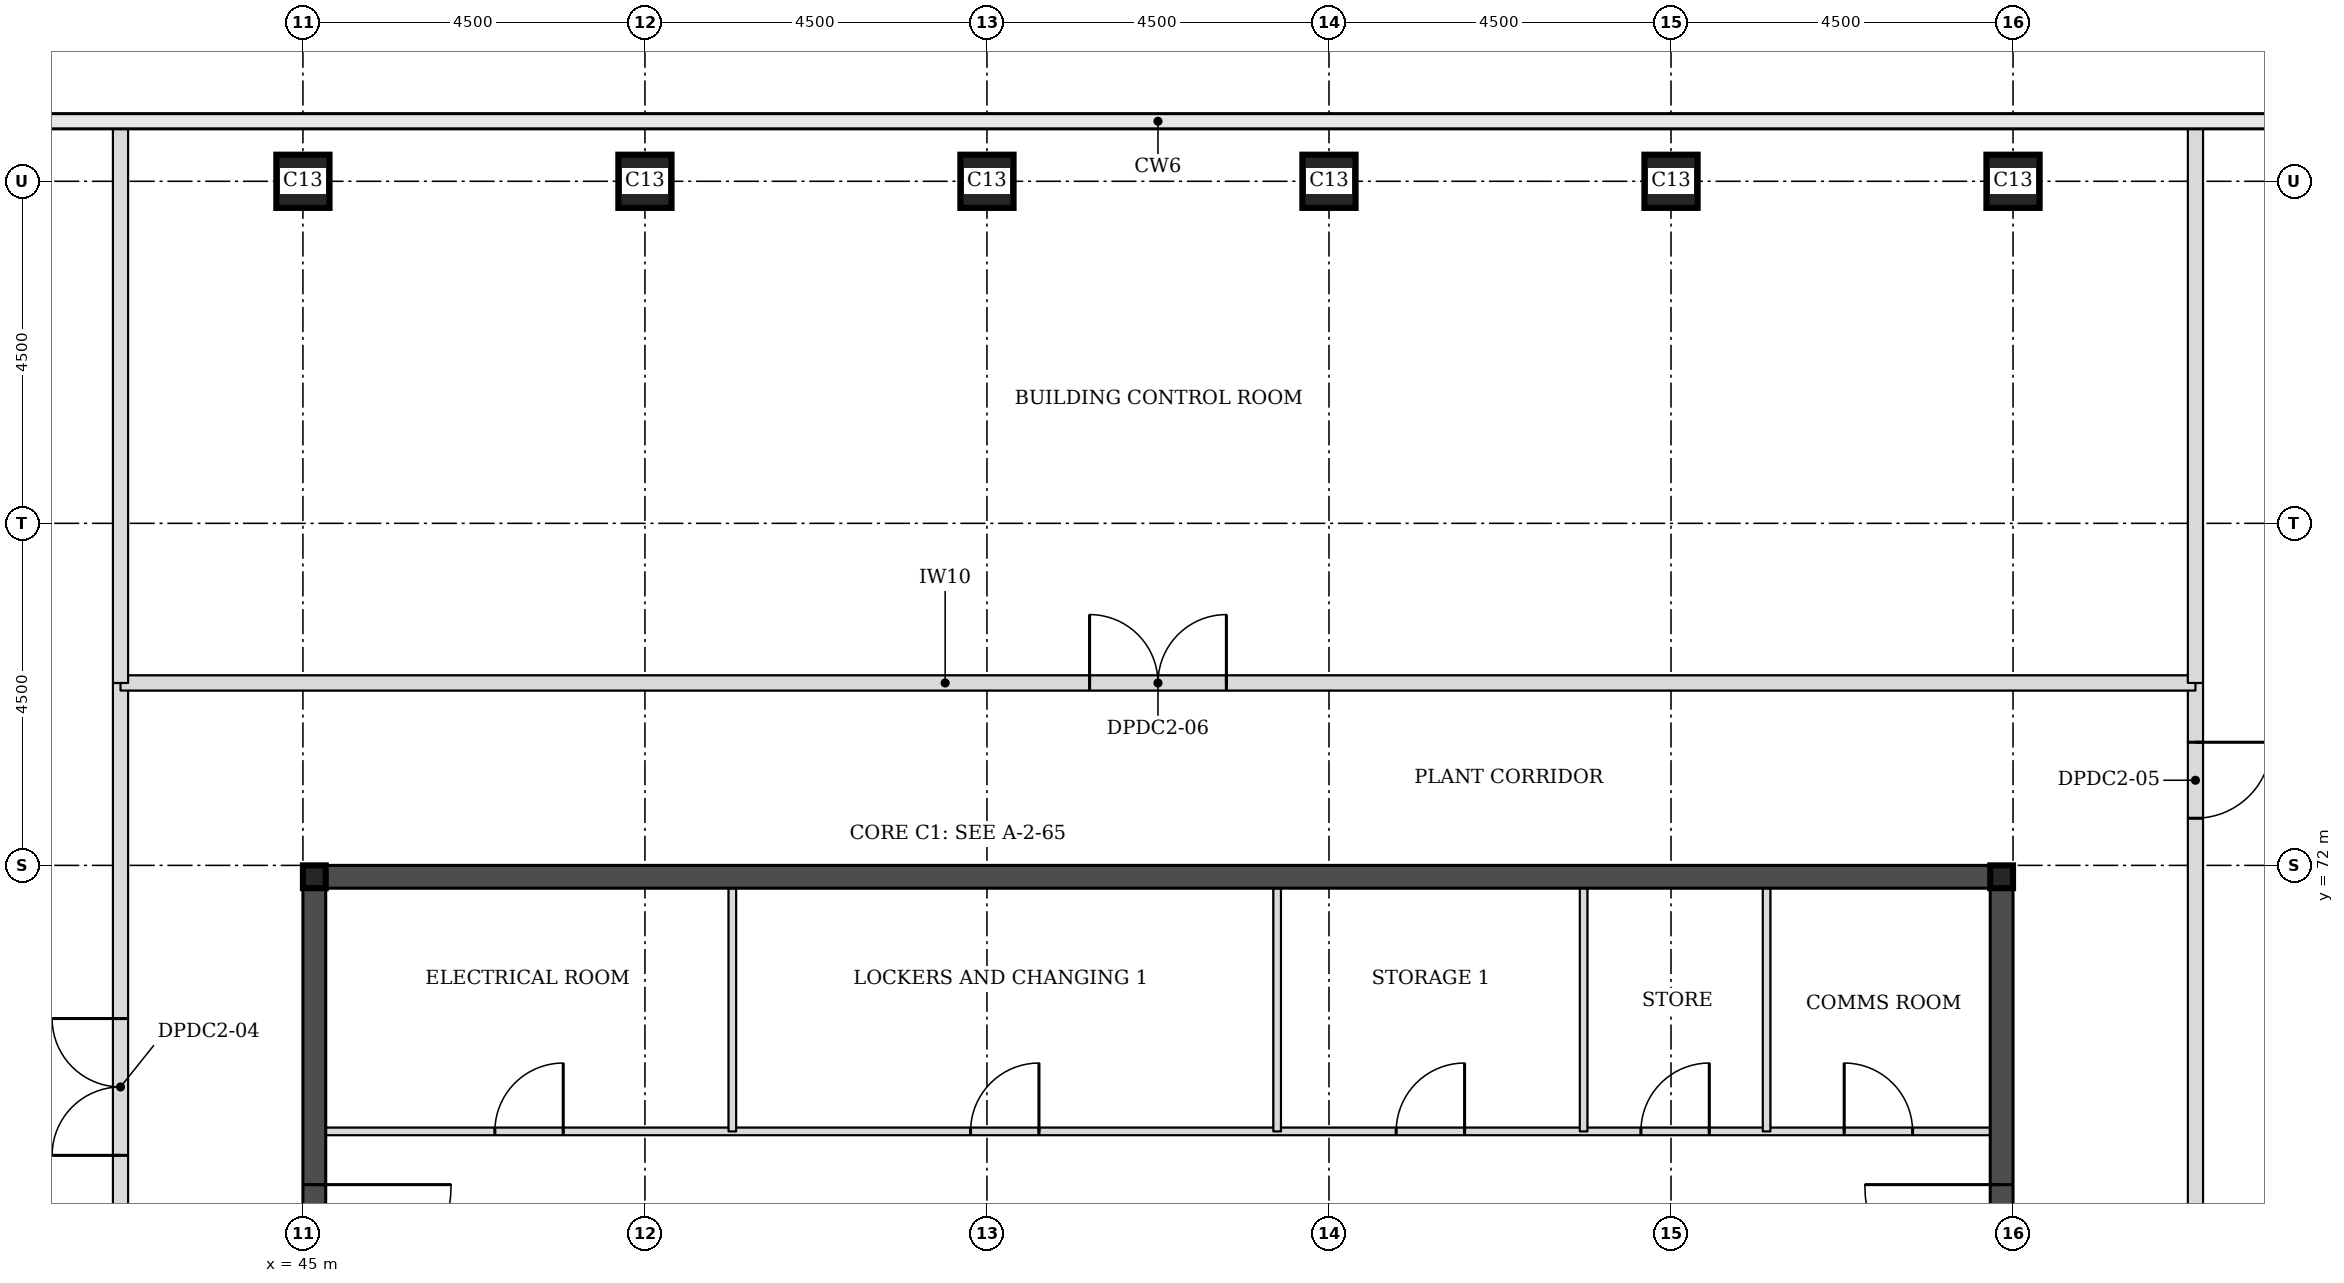
"""IFC4 building model, lengths in metres.
Left out: names, types, materials, properties, quantities, classifications, styles, units other than length and angle.
Written with IfcOpenShell. Run it as: python <this file> out.ifc"""

import sys

from ifc_helpers import new_model, si_unit, direction, frame, frame_2d, origin, origin_2d, place, context, subcontext, project, spatial, rectangle, extrude, element, fill, save


model = new_model("IFC4")
c1 = context("Model", 3, precision=1e-05, world=origin(), true_north=direction((0.0, 1.0)))
c2 = subcontext(c1, "Body", "Model", "MODEL_VIEW")
j1 = project(units=[si_unit("LENGTHUNIT", "METRE"), si_unit("PLANEANGLEUNIT", "RADIAN")], contexts=[c1])
p1 = place(None, origin())
s1 = spatial("IfcSite", under=j1, at=p1, CompositionType="ELEMENT")
p2 = place(p1, origin())
s2 = spatial("IfcBuilding", under=s1, at=p2, CompositionType="ELEMENT")
p3 = place(p2, frame((0.0, 0.0, 268.7)))
s3 = spatial("IfcBuildingStorey", under=s2, at=p3, CompositionType="ELEMENT", Elevation=268.7)
for number, where, z_axis, x_axis in (
    (1, (45.0, 81.0, 0.0), (0.0, 0.0, 1.0), (1.0, 0.0, 0.0)),
    (2, (49.5, 81.0, 0.0), (0.0, 0.0, 1.0), (1.0, 0.0, 0.0)),
    (3, (54.0, 81.0, 0.0), (0.0, 0.0, 1.0), (1.0, 0.0, 0.0)),
    (4, (58.5, 81.0, 0.0), (0.0, 0.0, 1.0), (1.0, 0.0, 0.0)),
    (5, (63.0, 81.0, 0.0), (0.0, 0.0, 1.0), (1.0, 0.0, 0.0)),
    (6, (67.5, 81.0, 0.0), (0.0, 0.0, 1.0), (1.0, 0.0, 0.0)),
):
    element("IfcColumn", number, at=place(p3, frame(where, z_axis=z_axis, x_axis=x_axis)), inside=s3, PredefinedType="COLUMN", context=c2, shape_type="SweptSolid", body=[
        extrude(rectangle(XDim=0.7, YDim=0.7, at=origin_2d()), origin(), (0.0, 0.0, 1.0), 5.0),
    ])
p4 = place(p3, frame((45.3, 71.85, 0.0), z_axis=(0.0, 0.0, 1.0), x_axis=(1.0, 0.0, 0.0)))
e7 = element("IfcWall", 7, at=p4, inside=s3, PredefinedType="SHEAR", context=c2, shape_type="SweptSolid", body=[
    extrude(rectangle(XDim=21.9, YDim=0.3, at=frame_2d((10.95, 0.0))), origin(), (0.0, 0.0, 1.0), 5.0),
])
p5 = place(p3, frame((45.15, 49.5, 0.0), z_axis=(0.0, 0.0, 1.0), x_axis=(0.0, 1.0, 0.0)))
e8 = element("IfcWall", 8, at=p5, inside=s3, PredefinedType="SHEAR", context=c2, shape_type="SweptSolid", body=[
    extrude(rectangle(XDim=22.5, YDim=0.3, at=frame_2d((11.25, 0.0))), origin(), (0.0, 0.0, 1.0), 5.0),
])
p6 = place(p5, frame((4.2, 0.0, 0.0)))
e9 = element("IfcOpeningElement", 9, at=p6, cuts=e8, PredefinedType="OPENING", context=c2, shape_type="SweptSolid", body=[
    extrude(rectangle(XDim=1.8, YDim=2.1, at=frame_2d((0.9, 1.05))), frame((0.0, 0.16, 0.0), z_axis=(0.0, -1.0, 0.0), x_axis=(1.0, 0.0, 0.0)), (0.0, 0.0, 1.0), 0.32),
])
p7 = place(p5, frame((6.9, 0.0, 0.0)))
e10 = element("IfcOpeningElement", 10, at=p7, cuts=e8, PredefinedType="OPENING", context=c2, shape_type="SweptSolid", body=[
    extrude(rectangle(XDim=1.1, YDim=2.1, at=frame_2d((0.55, 1.05))), frame((0.0, 0.16, 0.0), z_axis=(0.0, -1.0, 0.0), x_axis=(1.0, 0.0, 0.0)), (0.0, 0.0, 1.0), 0.32),
])
p8 = place(p5, frame((13.6, 0.0, 0.0)))
e11 = element("IfcOpeningElement", 11, at=p8, cuts=e8, PredefinedType="OPENING", context=c2, shape_type="SweptSolid", body=[
    extrude(rectangle(XDim=1.1, YDim=2.1, at=frame_2d((0.55, 1.05))), frame((0.0, 0.16, 0.0), z_axis=(0.0, -1.0, 0.0), x_axis=(1.0, 0.0, 0.0)), (0.0, 0.0, 1.0), 0.32),
])
p9 = place(p5, frame((16.5, 0.0, 0.0)))
e12 = element("IfcOpeningElement", 12, at=p9, cuts=e8, PredefinedType="OPENING", context=c2, shape_type="SweptSolid", body=[
    extrude(rectangle(XDim=1.8, YDim=2.1, at=frame_2d((0.9, 1.05))), frame((0.0, 0.16, 0.0), z_axis=(0.0, -1.0, 0.0), x_axis=(1.0, 0.0, 0.0)), (0.0, 0.0, 1.0), 0.32),
])
p10 = place(p3, frame((67.35, 49.5, 0.0), z_axis=(0.0, 0.0, 1.0), x_axis=(0.0, 1.0, 0.0)))
e13 = element("IfcWall", 13, at=p10, inside=s3, PredefinedType="SHEAR", context=c2, shape_type="SweptSolid", body=[
    extrude(rectangle(XDim=22.5, YDim=0.3, at=frame_2d((11.25, 0.0))), origin(), (0.0, 0.0, 1.0), 5.0),
])
p11 = place(p10, frame((4.2, 0.0, 0.0)))
e14 = element("IfcOpeningElement", 14, at=p11, cuts=e13, PredefinedType="OPENING", context=c2, shape_type="SweptSolid", body=[
    extrude(rectangle(XDim=1.8, YDim=2.1, at=frame_2d((0.9, 1.05))), frame((0.0, 0.16, 0.0), z_axis=(0.0, -1.0, 0.0), x_axis=(1.0, 0.0, 0.0)), (0.0, 0.0, 1.0), 0.32),
])
p12 = place(p10, frame((6.9, 0.0, 0.0)))
e15 = element("IfcOpeningElement", 15, at=p12, cuts=e13, PredefinedType="OPENING", context=c2, shape_type="SweptSolid", body=[
    extrude(rectangle(XDim=1.1, YDim=2.1, at=frame_2d((0.55, 1.05))), frame((0.0, 0.16, 0.0), z_axis=(0.0, -1.0, 0.0), x_axis=(1.0, 0.0, 0.0)), (0.0, 0.0, 1.0), 0.32),
])
p13 = place(p10, frame((13.6, 0.0, 0.0)))
e16 = element("IfcOpeningElement", 16, at=p13, cuts=e13, PredefinedType="OPENING", context=c2, shape_type="SweptSolid", body=[
    extrude(rectangle(XDim=1.1, YDim=2.1, at=frame_2d((0.55, 1.05))), frame((0.0, 0.16, 0.0), z_axis=(0.0, -1.0, 0.0), x_axis=(1.0, 0.0, 0.0)), (0.0, 0.0, 1.0), 0.32),
])
p14 = place(p10, frame((16.5, 0.0, 0.0)))
e17 = element("IfcOpeningElement", 17, at=p14, cuts=e13, PredefinedType="OPENING", context=c2, shape_type="SweptSolid", body=[
    extrude(rectangle(XDim=1.8, YDim=2.1, at=frame_2d((0.9, 1.05))), frame((0.0, 0.16, 0.0), z_axis=(0.0, -1.0, 0.0), x_axis=(1.0, 0.0, 0.0)), (0.0, 0.0, 1.0), 0.32),
])
p15 = place(p3, frame((42.6, 58.0, 0.0), z_axis=(0.0, 0.0, 1.0), x_axis=(0.0, 1.0, 0.0)))
e18 = element("IfcWall", 18, at=p15, inside=s3, PredefinedType="PARTITIONING", context=c2, shape_type="SweptSolid", body=[
    extrude(rectangle(XDim=16.4, YDim=0.2, at=frame_2d((8.2, 0.0))), origin(), (0.0, 0.0, 1.0), 4.75),
])
p16 = place(p15, frame((10.185, 0.0, 0.0)))
e19 = element("IfcOpeningElement", 19, at=p16, cuts=e18, PredefinedType="OPENING", context=c2, shape_type="SweptSolid", body=[
    extrude(rectangle(XDim=1.8, YDim=2.1, at=frame_2d((0.9, 1.05))), frame((0.0, 0.11, 0.0), z_axis=(0.0, -1.0, 0.0), x_axis=(1.0, 0.0, 0.0)), (0.0, 0.0, 1.0), 0.22),
])
p17 = place(p3, frame((69.9, 66.0, 0.0), z_axis=(0.0, 0.0, 1.0), x_axis=(0.0, 1.0, 0.0)))
e20 = element("IfcWall", 20, at=p17, inside=s3, PredefinedType="PARTITIONING", context=c2, shape_type="SweptSolid", body=[
    extrude(rectangle(XDim=8.4, YDim=0.2, at=frame_2d((4.2, 0.0))), origin(), (0.0, 0.0, 1.0), 4.75),
])
p18 = place(p17, frame((6.62, 0.0, 0.0)))
e21 = element("IfcOpeningElement", 21, at=p18, cuts=e20, PredefinedType="OPENING", context=c2, shape_type="SweptSolid", body=[
    extrude(rectangle(XDim=1.0, YDim=2.1, at=frame_2d((0.5, 1.05))), frame((0.0, 0.11, 0.0), z_axis=(0.0, -1.0, 0.0), x_axis=(1.0, 0.0, 0.0)), (0.0, 0.0, 1.0), 0.22),
])
p19 = place(p3, frame((42.6, 74.4, 0.0), z_axis=(0.0, 0.0, 1.0), x_axis=(1.0, 0.0, 0.0)))
e22 = element("IfcWall", 22, at=p19, inside=s3, PredefinedType="PARTITIONING", context=c2, shape_type="SweptSolid", body=[
    extrude(rectangle(XDim=27.3, YDim=0.2, at=frame_2d((13.65, 0.0))), origin(), (0.0, 0.0, 1.0), 4.75),
])
p20 = place(p19, frame((12.75, 0.0, 0.0)))
e23 = element("IfcOpeningElement", 23, at=p20, cuts=e22, PredefinedType="OPENING", context=c2, shape_type="SweptSolid", body=[
    extrude(rectangle(XDim=1.8, YDim=2.1, at=frame_2d((0.9, 1.05))), frame((0.0, 0.11, 0.0), z_axis=(0.0, -1.0, 0.0), x_axis=(1.0, 0.0, 0.0)), (0.0, 0.0, 1.0), 0.22),
])
for number, where, z_axis, x_axis in (
    (24, (42.6, 74.4, 0.0), (0.0, 0.0, 1.0), (0.0, 1.0, 0.0)),
    (25, (69.9, 74.4, 0.0), (0.0, 0.0, 1.0), (0.0, 1.0, 0.0)),
):
    element("IfcWall", number, at=place(p3, frame(where, z_axis=z_axis, x_axis=x_axis)), inside=s3, PredefinedType="PARTITIONING", context=c2, shape_type="SweptSolid", body=[
        extrude(rectangle(XDim=7.3, YDim=0.2, at=frame_2d((3.65, 0.0))), origin(), (0.0, 0.0, 1.0), 4.75),
    ])
p21 = place(p3, frame((45.3, 68.5, 0.0), z_axis=(0.0, 0.0, 1.0), x_axis=(1.0, 0.0, 0.0)))
e26 = element("IfcWall", 26, at=p21, inside=s3, PredefinedType="PARTITIONING", context=c2, shape_type="SweptSolid", body=[
    extrude(rectangle(XDim=21.9, YDim=0.1, at=frame_2d((10.95, 0.0))), origin(), (0.0, 0.0, 1.0), 4.75),
])
p22 = place(p21, frame((19.979, 0.0, 0.0)))
e27 = element("IfcOpeningElement", 27, at=p22, cuts=e26, PredefinedType="OPENING", context=c2, shape_type="SweptSolid", body=[
    extrude(rectangle(XDim=0.9, YDim=2.1, at=frame_2d((0.45, 1.05))), frame((0.0, 0.06, 0.0), z_axis=(0.0, -1.0, 0.0), x_axis=(1.0, 0.0, 0.0)), (0.0, 0.0, 1.0), 0.12),
])
p23 = place(p21, frame((17.304, 0.0, 0.0)))
e28 = element("IfcOpeningElement", 28, at=p23, cuts=e26, PredefinedType="OPENING", context=c2, shape_type="SweptSolid", body=[
    extrude(rectangle(XDim=0.9, YDim=2.1, at=frame_2d((0.45, 1.05))), frame((0.0, 0.06, 0.0), z_axis=(0.0, -1.0, 0.0), x_axis=(1.0, 0.0, 0.0)), (0.0, 0.0, 1.0), 0.12),
])
p24 = place(p21, frame((2.225, 0.0, 0.0)))
e29 = element("IfcOpeningElement", 29, at=p24, cuts=e26, PredefinedType="OPENING", context=c2, shape_type="SweptSolid", body=[
    extrude(rectangle(XDim=0.9, YDim=2.1, at=frame_2d((0.45, 1.05))), frame((0.0, 0.06, 0.0), z_axis=(0.0, -1.0, 0.0), x_axis=(1.0, 0.0, 0.0)), (0.0, 0.0, 1.0), 0.12),
])
p25 = place(p21, frame((14.084, 0.0, 0.0)))
e30 = element("IfcOpeningElement", 30, at=p25, cuts=e26, PredefinedType="OPENING", context=c2, shape_type="SweptSolid", body=[
    extrude(rectangle(XDim=0.9, YDim=2.1, at=frame_2d((0.45, 1.05))), frame((0.0, 0.06, 0.0), z_axis=(0.0, -1.0, 0.0), x_axis=(1.0, 0.0, 0.0)), (0.0, 0.0, 1.0), 0.12),
])
p26 = place(p21, frame((8.484, 0.0, 0.0)))
e31 = element("IfcOpeningElement", 31, at=p26, cuts=e26, PredefinedType="OPENING", context=c2, shape_type="SweptSolid", body=[
    extrude(rectangle(XDim=0.9, YDim=2.1, at=frame_2d((0.45, 1.05))), frame((0.0, 0.06, 0.0), z_axis=(0.0, -1.0, 0.0), x_axis=(1.0, 0.0, 0.0)), (0.0, 0.0, 1.0), 0.12),
])
for number, where, z_axis, x_axis in (
    (32, (50.65, 68.5, 0.0), (0.0, 0.0, 1.0), (0.0, 1.0, 0.0)),
    (33, (57.818, 68.5, 0.0), (0.0, 0.0, 1.0), (0.0, 1.0, 0.0)),
    (34, (61.85, 68.5, 0.0), (0.0, 0.0, 1.0), (0.0, 1.0, 0.0)),
    (35, (64.258, 68.5, 0.0), (0.0, 0.0, 1.0), (0.0, 1.0, 0.0)),
):
    element("IfcWall", number, at=place(p3, frame(where, z_axis=z_axis, x_axis=x_axis)), inside=s3, PredefinedType="PARTITIONING", context=c2, shape_type="SweptSolid", body=[
        extrude(rectangle(XDim=3.2, YDim=0.1, at=frame_2d((1.6, 0.0))), origin(), (0.0, 0.0, 1.0), 4.75),
    ])
p27 = place(p18, frame((1.0, 0.0, 0.0), z_axis=(0.0, 0.0, 1.0), x_axis=(-1.0, 0.0, 0.0)))
e36 = element("IfcDoor", 36, at=p27, inside=s3, OperationType="SINGLE_SWING_LEFT", PredefinedType="DOOR", context=c2, shape_type="SweptSolid", body=[
    extrude(rectangle(XDim=1.0, YDim=2.1, at=frame_2d((0.5, 1.05))), frame((0.0, 0.025, 0.0), z_axis=(0.0, -1.0, 0.0), x_axis=(1.0, 0.0, 0.0)), (0.0, 0.0, 1.0), 0.05),
])
fill(e21, e36)
p28 = place(p20, origin())
e37 = element("IfcDoor", 37, at=p28, inside=s3, OperationType="DOUBLE_DOOR_SINGLE_SWING", PredefinedType="DOOR", context=c2, shape_type="SweptSolid", body=[
    extrude(rectangle(XDim=1.8, YDim=2.1, at=frame_2d((0.9, 1.05))), frame((0.0, 0.025, 0.0), z_axis=(0.0, -1.0, 0.0), x_axis=(1.0, 0.0, 0.0)), (0.0, 0.0, 1.0), 0.05),
])
fill(e23, e37)
p29 = place(p16, origin())
e38 = element("IfcDoor", 38, at=p29, inside=s3, OperationType="DOUBLE_DOOR_SINGLE_SWING", PredefinedType="DOOR", context=c2, shape_type="SweptSolid", body=[
    extrude(rectangle(XDim=1.8, YDim=2.1, at=frame_2d((0.9, 1.05))), frame((0.0, 0.025, 0.0), z_axis=(0.0, -1.0, 0.0), x_axis=(1.0, 0.0, 0.0)), (0.0, 0.0, 1.0), 0.05),
])
fill(e19, e38)
p30 = place(p9, frame((1.8, 0.0, 0.0), z_axis=(0.0, 0.0, 1.0), x_axis=(-1.0, 0.0, 0.0)))
e39 = element("IfcDoor", 39, at=p30, inside=s3, OperationType="SINGLE_SWING_LEFT", PredefinedType="DOOR", context=c2, shape_type="SweptSolid", body=[
    extrude(rectangle(XDim=1.8, YDim=2.1, at=frame_2d((0.9, 1.05))), frame((0.0, 0.025, 0.0), z_axis=(0.0, -1.0, 0.0), x_axis=(1.0, 0.0, 0.0)), (0.0, 0.0, 1.0), 0.05),
])
fill(e12, e39)
p31 = place(p14, origin())
e40 = element("IfcDoor", 40, at=p31, inside=s3, OperationType="SINGLE_SWING_RIGHT", PredefinedType="DOOR", context=c2, shape_type="SweptSolid", body=[
    extrude(rectangle(XDim=1.8, YDim=2.1, at=frame_2d((0.9, 1.05))), frame((0.0, 0.025, 0.0), z_axis=(0.0, -1.0, 0.0), x_axis=(1.0, 0.0, 0.0)), (0.0, 0.0, 1.0), 0.05),
])
fill(e17, e40)
p32 = place(p22, origin())
e41 = element("IfcDoor", 41, at=p32, inside=s3, OperationType="SINGLE_SWING_LEFT", PredefinedType="DOOR", context=c2, shape_type="SweptSolid", body=[
    extrude(rectangle(XDim=0.9, YDim=2.1, at=frame_2d((0.45, 1.05))), frame((0.0, 0.025, 0.0), z_axis=(0.0, -1.0, 0.0), x_axis=(1.0, 0.0, 0.0)), (0.0, 0.0, 1.0), 0.05),
])
fill(e27, e41)
p33 = place(p23, origin())
e42 = element("IfcDoor", 42, at=p33, inside=s3, OperationType="SINGLE_SWING_RIGHT", PredefinedType="DOOR", context=c2, shape_type="SweptSolid", body=[
    extrude(rectangle(XDim=0.9, YDim=2.1, at=frame_2d((0.45, 1.05))), frame((0.0, 0.025, 0.0), z_axis=(0.0, -1.0, 0.0), x_axis=(1.0, 0.0, 0.0)), (0.0, 0.0, 1.0), 0.05),
])
fill(e28, e42)
p34 = place(p24, origin())
e43 = element("IfcDoor", 43, at=p34, inside=s3, OperationType="SINGLE_SWING_RIGHT", PredefinedType="DOOR", context=c2, shape_type="SweptSolid", body=[
    extrude(rectangle(XDim=0.9, YDim=2.1, at=frame_2d((0.45, 1.05))), frame((0.0, 0.025, 0.0), z_axis=(0.0, -1.0, 0.0), x_axis=(1.0, 0.0, 0.0)), (0.0, 0.0, 1.0), 0.05),
])
fill(e29, e43)
p35 = place(p25, origin())
e44 = element("IfcDoor", 44, at=p35, inside=s3, OperationType="SINGLE_SWING_RIGHT", PredefinedType="DOOR", context=c2, shape_type="SweptSolid", body=[
    extrude(rectangle(XDim=0.9, YDim=2.1, at=frame_2d((0.45, 1.05))), frame((0.0, 0.025, 0.0), z_axis=(0.0, -1.0, 0.0), x_axis=(1.0, 0.0, 0.0)), (0.0, 0.0, 1.0), 0.05),
])
fill(e30, e44)
p36 = place(p26, origin())
e45 = element("IfcDoor", 45, at=p36, inside=s3, OperationType="SINGLE_SWING_RIGHT", PredefinedType="DOOR", context=c2, shape_type="SweptSolid", body=[
    extrude(rectangle(XDim=0.9, YDim=2.1, at=frame_2d((0.45, 1.05))), frame((0.0, 0.025, 0.0), z_axis=(0.0, -1.0, 0.0), x_axis=(1.0, 0.0, 0.0)), (0.0, 0.0, 1.0), 0.05),
])
fill(e31, e45)
save(model, sys.argv[1])
